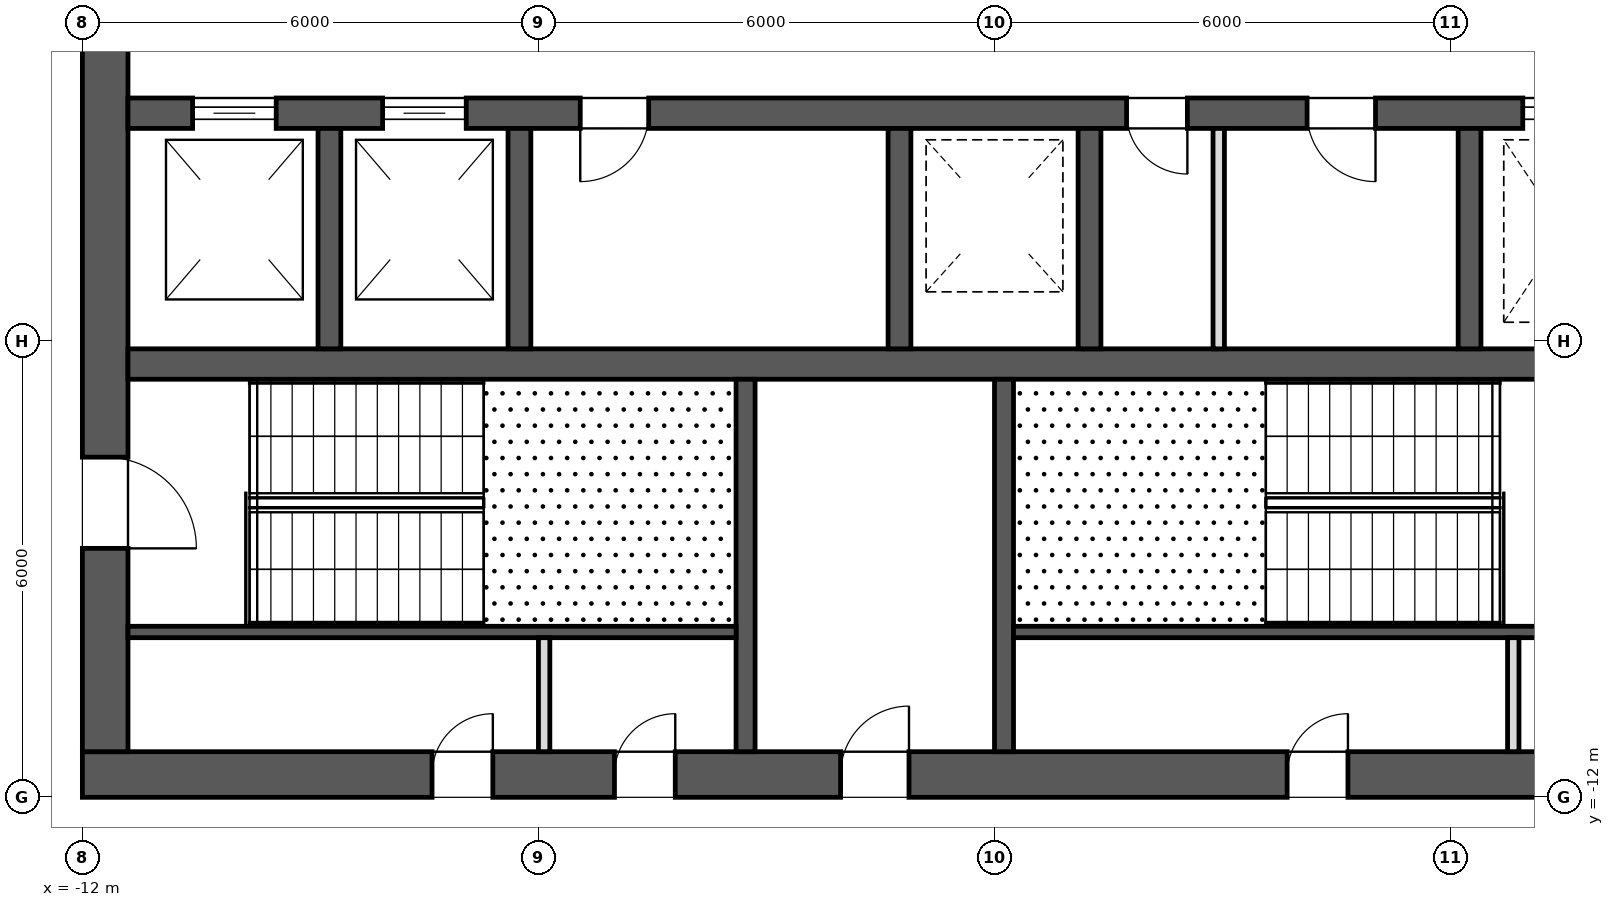
"""IFC4 building model, lengths in metres.
Left out: names, types, materials, properties, quantities, classifications, styles, units other than length and angle.
Written with IfcOpenShell. Run it as: python <this file> out.ifc"""

import sys

from ifc_helpers import new_model, si_unit, direction, frame, frame_2d, origin, place, context, subcontext, project, spatial, rectangle, extrude, element, fill, save


model = new_model("IFC4")
c1 = context("Model", 3, precision=1e-05, world=origin(), true_north=direction((0.0, 1.0)))
c2 = subcontext(c1, "Body", "Model", "MODEL_VIEW")
j1 = project(units=[si_unit("LENGTHUNIT", "METRE"), si_unit("PLANEANGLEUNIT", "RADIAN")], contexts=[c1])
p1 = place(None, origin())
s1 = spatial("IfcSite", under=j1, at=p1, CompositionType="ELEMENT")
p2 = place(p1, origin())
s2 = spatial("IfcBuilding", under=s1, at=p2, CompositionType="ELEMENT")
p3 = place(p2, frame((0.0, 0.0, 324.3)))
s3 = spatial("IfcBuildingStorey", under=s2, at=p3, CompositionType="ELEMENT", Elevation=324.3)
p4 = place(p3, frame((-12.0, -11.7, 0.0), z_axis=(0.0, 0.0, 1.0), x_axis=(1.0, 0.0, 0.0)))
e1 = element("IfcWall", 1, at=p4, inside=s3, PredefinedType="SHEAR", context=c2, shape_type="SweptSolid", body=[
    extrude(rectangle(XDim=24.0, YDim=0.6, at=frame_2d((12.0, 0.0))), origin(), (0.0, 0.0, 1.0), 4.0),
])
p5 = place(p4, frame((9.975, 0.0, 0.0)))
e2 = element("IfcOpeningElement", 2, at=p5, cuts=e1, PredefinedType="OPENING", context=c2, shape_type="SweptSolid", body=[
    extrude(rectangle(XDim=0.9, YDim=2.1, at=frame_2d((0.45, 1.05))), frame((0.0, 0.312, 0.0), z_axis=(0.0, -1.0, 0.0), x_axis=(1.0, 0.0, 0.0)), (0.0, 0.0, 1.0), 0.624),
])
p6 = place(p4, frame((4.6, 0.0, 0.0)))
e3 = element("IfcOpeningElement", 3, at=p6, cuts=e1, PredefinedType="OPENING", context=c2, shape_type="SweptSolid", body=[
    extrude(rectangle(XDim=0.8, YDim=2.1, at=frame_2d((0.4, 1.05))), frame((0.0, 0.312, 0.0), z_axis=(0.0, -1.0, 0.0), x_axis=(1.0, 0.0, 0.0)), (0.0, 0.0, 1.0), 0.624),
])
p7 = place(p4, frame((7.0, 0.0, 0.0)))
e4 = element("IfcOpeningElement", 4, at=p7, cuts=e1, PredefinedType="OPENING", context=c2, shape_type="SweptSolid", body=[
    extrude(rectangle(XDim=0.8, YDim=2.1, at=frame_2d((0.4, 1.05))), frame((0.0, 0.312, 0.0), z_axis=(0.0, -1.0, 0.0), x_axis=(1.0, 0.0, 0.0)), (0.0, 0.0, 1.0), 0.624),
])
p8 = place(p4, frame((15.85, 0.0, 0.0)))
e5 = element("IfcOpeningElement", 5, at=p8, cuts=e1, PredefinedType="OPENING", context=c2, shape_type="SweptSolid", body=[
    extrude(rectangle(XDim=0.8, YDim=2.1, at=frame_2d((0.4, 1.05))), frame((0.0, 0.312, 0.0), z_axis=(0.0, -1.0, 0.0), x_axis=(1.0, 0.0, 0.0)), (0.0, 0.0, 1.0), 0.624),
])
p9 = place(p3, frame((-11.7, -11.4, 0.0), z_axis=(0.0, 0.0, 1.0), x_axis=(0.0, 1.0, 0.0)))
e6 = element("IfcWall", 6, at=p9, inside=s3, PredefinedType="SHEAR", context=c2, shape_type="SweptSolid", body=[
    extrude(rectangle(XDim=22.8, YDim=0.6, at=frame_2d((11.4, 0.0))), origin(), (0.0, 0.0, 1.0), 4.0),
])
p10 = place(p9, frame((10.2, 0.0, 0.0)))
e7 = element("IfcOpeningElement", 7, at=p10, cuts=e6, PredefinedType="OPENING", context=c2, shape_type="SweptSolid", body=[
    extrude(rectangle(XDim=2.4, YDim=2.1, at=frame_2d((1.2, 1.05))), frame((0.0, 0.312, 0.0), z_axis=(0.0, -1.0, 0.0), x_axis=(1.0, 0.0, 0.0)), (0.0, 0.0, 1.0), 0.624),
])
p11 = place(p9, frame((18.925, 0.0, 0.0)))
e8 = element("IfcOpeningElement", 8, at=p11, cuts=e6, PredefinedType="OPENING", context=c2, shape_type="SweptSolid", body=[
    extrude(rectangle(XDim=1.2, YDim=2.1, at=frame_2d((0.6, 1.05))), frame((0.0, 0.312, 0.0), z_axis=(0.0, -1.0, 0.0), x_axis=(1.0, 0.0, 0.0)), (0.0, 0.0, 1.0), 0.624),
])
p12 = place(p9, frame((2.675, 0.0, 0.0)))
e9 = element("IfcOpeningElement", 9, at=p12, cuts=e6, PredefinedType="OPENING", context=c2, shape_type="SweptSolid", body=[
    extrude(rectangle(XDim=1.2, YDim=2.1, at=frame_2d((0.6, 1.05))), frame((0.0, 0.312, 0.0), z_axis=(0.0, -1.0, 0.0), x_axis=(1.0, 0.0, 0.0)), (0.0, 0.0, 1.0), 0.624),
])
p13 = place(p3, frame((-11.4, -3.0, 0.0), z_axis=(0.0, 0.0, 1.0), x_axis=(1.0, 0.0, 0.0)))
e10 = element("IfcWall", 10, at=p13, inside=s3, PredefinedType="SHEAR", context=c2, shape_type="SweptSolid", body=[
    extrude(rectangle(XDim=22.8, YDim=0.4, at=frame_2d((11.4, 0.0))), origin(), (0.0, 0.0, 1.0), 4.0),
])
p14 = place(p13, frame((0.85, 0.0, 0.0)))
e11 = element("IfcOpeningElement", 11, at=p14, cuts=e10, PredefinedType="OPENING", context=c2, shape_type="SweptSolid", body=[
    extrude(rectangle(XDim=1.1, YDim=2.1, at=frame_2d((0.55, 1.05))), frame((0.0, 0.212, 0.0), z_axis=(0.0, -1.0, 0.0), x_axis=(1.0, 0.0, 0.0)), (0.0, 0.0, 1.0), 0.424),
])
p15 = place(p13, frame((3.35, 0.0, 0.0)))
e12 = element("IfcOpeningElement", 12, at=p15, cuts=e10, PredefinedType="OPENING", context=c2, shape_type="SweptSolid", body=[
    extrude(rectangle(XDim=1.1, YDim=2.1, at=frame_2d((0.55, 1.05))), frame((0.0, 0.212, 0.0), z_axis=(0.0, -1.0, 0.0), x_axis=(1.0, 0.0, 0.0)), (0.0, 0.0, 1.0), 0.424),
])
p16 = place(p13, frame((18.35, 0.0, 0.0)))
e13 = element("IfcOpeningElement", 13, at=p16, cuts=e10, PredefinedType="OPENING", context=c2, shape_type="SweptSolid", body=[
    extrude(rectangle(XDim=1.1, YDim=2.1, at=frame_2d((0.55, 1.05))), frame((0.0, 0.212, 0.0), z_axis=(0.0, -1.0, 0.0), x_axis=(1.0, 0.0, 0.0)), (0.0, 0.0, 1.0), 0.424),
])
p17 = place(p13, frame((13.137, 0.0, 0.0)))
e14 = element("IfcOpeningElement", 14, at=p17, cuts=e10, PredefinedType="OPENING", context=c2, shape_type="SweptSolid", body=[
    extrude(rectangle(XDim=0.8, YDim=2.1, at=frame_2d((0.4, 1.05))), frame((0.0, 0.212, 0.0), z_axis=(0.0, -1.0, 0.0), x_axis=(1.0, 0.0, 0.0)), (0.0, 0.0, 1.0), 0.424),
])
p18 = place(p13, frame((15.512, 0.0, 0.0)))
e15 = element("IfcOpeningElement", 15, at=p18, cuts=e10, PredefinedType="OPENING", context=c2, shape_type="SweptSolid", body=[
    extrude(rectangle(XDim=0.9, YDim=2.1, at=frame_2d((0.45, 1.05))), frame((0.0, 0.212, 0.0), z_axis=(0.0, -1.0, 0.0), x_axis=(1.0, 0.0, 0.0)), (0.0, 0.0, 1.0), 0.424),
])
p19 = place(p13, frame((5.95, 0.0, 0.0)))
e16 = element("IfcOpeningElement", 16, at=p19, cuts=e10, PredefinedType="OPENING", context=c2, shape_type="SweptSolid", body=[
    extrude(rectangle(XDim=0.9, YDim=2.1, at=frame_2d((0.45, 1.05))), frame((0.0, 0.212, 0.0), z_axis=(0.0, -1.0, 0.0), x_axis=(1.0, 0.0, 0.0)), (0.0, 0.0, 1.0), 0.424),
])
p20 = place(p3, frame((-11.4, -6.3, 0.0), z_axis=(0.0, 0.0, 1.0), x_axis=(1.0, 0.0, 0.0)))
e17 = element("IfcWall", 17, at=p20, inside=s3, PredefinedType="SHEAR", context=c2, shape_type="SweptSolid", body=[
    extrude(rectangle(XDim=22.8, YDim=0.4, at=frame_2d((11.4, 0.0))), origin(), (0.0, 0.0, 1.0), 4.0),
])
p21 = place(p20, frame((20.85, 0.0, 0.0)))
e18 = element("IfcOpeningElement", 18, at=p21, cuts=e17, PredefinedType="OPENING", context=c2, shape_type="SweptSolid", body=[
    extrude(rectangle(XDim=1.1, YDim=2.1, at=frame_2d((0.55, 1.05))), frame((0.0, 0.212, 0.0), z_axis=(0.0, -1.0, 0.0), x_axis=(1.0, 0.0, 0.0)), (0.0, 0.0, 1.0), 0.424),
])
for number, where, z_axis, x_axis in (
    (19, (-8.75, -6.1, 0.0), (0.0, 0.0, 1.0), (0.0, 1.0, 0.0)),
    (20, (-6.25, -6.1, 0.0), (0.0, 0.0, 1.0), (0.0, 1.0, 0.0)),
    (21, (-1.25, -6.1, 0.0), (0.0, 0.0, 1.0), (0.0, 1.0, 0.0)),
    (22, (1.25, -6.1, 0.0), (0.0, 0.0, 1.0), (0.0, 1.0, 0.0)),
    (23, (6.25, -6.1, 0.0), (0.0, 0.0, 1.0), (0.0, 1.0, 0.0)),
):
    element("IfcWall", number, at=place(p3, frame(where, z_axis=z_axis, x_axis=x_axis)), inside=s3, PredefinedType="SHEAR", context=c2, shape_type="SweptSolid", body=[
        extrude(rectangle(XDim=2.9, YDim=0.3, at=frame_2d((1.45, 0.0))), origin(), (0.0, 0.0, 1.0), 4.0),
    ])
for number, where, z_axis, x_axis in (
    (24, (-3.275, -11.4, 0.0), (0.0, 0.0, 1.0), (0.0, 1.0, 0.0)),
    (25, (0.125, -11.4, 0.0), (0.0, 0.0, 1.0), (0.0, 1.0, 0.0)),
):
    element("IfcWall", number, at=place(p3, frame(where, z_axis=z_axis, x_axis=x_axis)), inside=s3, PredefinedType="SHEAR", context=c2, shape_type="SweptSolid", body=[
        extrude(rectangle(XDim=4.9, YDim=0.25, at=frame_2d((2.45, 0.0))), origin(), (0.0, 0.0, 1.0), 3.65),
    ])
for number, where, z_axis, x_axis in (
    (26, (-11.4, -9.825, 0.0), (0.0, 0.0, 1.0), (1.0, 0.0, 0.0)),
    (27, (0.25, -9.825, 0.0), (0.0, 0.0, 1.0), (1.0, 0.0, 0.0)),
):
    element("IfcWall", number, at=place(p3, frame(where, z_axis=z_axis, x_axis=x_axis)), inside=s3, PredefinedType="SHEAR", context=c2, shape_type="SweptSolid", body=[
        extrude(rectangle(XDim=8.0, YDim=0.15, at=frame_2d((4.0, 0.0))), origin(), (0.0, 0.0, 1.0), 3.65),
    ])
for number, where, z_axis, x_axis in (
    (28, (-5.925, -11.4, 0.0), (0.0, 0.0, 1.0), (0.0, 1.0, 0.0)),
    (29, (6.825, -11.4, 0.0), (0.0, 0.0, 1.0), (0.0, 1.0, 0.0)),
):
    element("IfcWall", number, at=place(p3, frame(where, z_axis=z_axis, x_axis=x_axis)), inside=s3, PredefinedType="PARTITIONING", context=c2, shape_type="SweptSolid", body=[
        extrude(rectangle(XDim=1.5, YDim=0.15, at=frame_2d((0.75, 0.0))), origin(), (0.0, 0.0, 1.0), 3.65),
    ])
p22 = place(p3, frame((2.95, -6.1, 0.0), z_axis=(0.0, 0.0, 1.0), x_axis=(0.0, 1.0, 0.0)))
e30 = element("IfcWall", 30, at=p22, inside=s3, PredefinedType="PARTITIONING", context=c2, shape_type="SweptSolid", body=[
    extrude(rectangle(XDim=2.9, YDim=0.15, at=frame_2d((1.45, 0.0))), origin(), (0.0, 0.0, 1.0), 3.65),
])
p23 = place(p14, origin())
e31 = element("IfcDoor", 31, at=p23, inside=s3, OperationType="SLIDING_TO_LEFT", PredefinedType="DOOR", context=c2, shape_type="SweptSolid", body=[
    extrude(rectangle(XDim=1.1, YDim=2.1, at=frame_2d((0.55, 1.05))), frame((0.0, 0.025, 0.0), z_axis=(0.0, -1.0, 0.0), x_axis=(1.0, 0.0, 0.0)), (0.0, 0.0, 1.0), 0.05),
])
fill(e11, e31)
p24 = place(p15, origin())
e32 = element("IfcDoor", 32, at=p24, inside=s3, OperationType="SLIDING_TO_LEFT", PredefinedType="DOOR", context=c2, shape_type="SweptSolid", body=[
    extrude(rectangle(XDim=1.1, YDim=2.1, at=frame_2d((0.55, 1.05))), frame((0.0, 0.025, 0.0), z_axis=(0.0, -1.0, 0.0), x_axis=(1.0, 0.0, 0.0)), (0.0, 0.0, 1.0), 0.05),
])
fill(e12, e32)
p25 = place(p16, origin())
e33 = element("IfcDoor", 33, at=p25, inside=s3, OperationType="SLIDING_TO_LEFT", PredefinedType="DOOR", context=c2, shape_type="SweptSolid", body=[
    extrude(rectangle(XDim=1.1, YDim=2.1, at=frame_2d((0.55, 1.05))), frame((0.0, 0.025, 0.0), z_axis=(0.0, -1.0, 0.0), x_axis=(1.0, 0.0, 0.0)), (0.0, 0.0, 1.0), 0.05),
])
fill(e13, e33)
p26 = place(p12, frame((1.2, 0.0, 0.0), z_axis=(0.0, 0.0, 1.0), x_axis=(-1.0, 0.0, 0.0)))
e34 = element("IfcDoor", 34, at=p26, inside=s3, OperationType="SINGLE_SWING_LEFT", PredefinedType="DOOR", context=c2, shape_type="SweptSolid", body=[
    extrude(rectangle(XDim=1.2, YDim=2.1, at=frame_2d((0.6, 1.05))), frame((0.0, 0.025, 0.0), z_axis=(0.0, -1.0, 0.0), x_axis=(1.0, 0.0, 0.0)), (0.0, 0.0, 1.0), 0.05),
])
fill(e9, e34)
p27 = place(p5, origin())
e35 = element("IfcDoor", 35, at=p27, inside=s3, OperationType="SINGLE_SWING_LEFT", PredefinedType="DOOR", context=c2, shape_type="SweptSolid", body=[
    extrude(rectangle(XDim=0.9, YDim=2.1, at=frame_2d((0.45, 1.05))), frame((0.0, 0.025, 0.0), z_axis=(0.0, -1.0, 0.0), x_axis=(1.0, 0.0, 0.0)), (0.0, 0.0, 1.0), 0.05),
])
fill(e2, e35)
p28 = place(p6, origin())
e36 = element("IfcDoor", 36, at=p28, inside=s3, OperationType="SINGLE_SWING_LEFT", PredefinedType="DOOR", context=c2, shape_type="SweptSolid", body=[
    extrude(rectangle(XDim=0.8, YDim=2.1, at=frame_2d((0.4, 1.05))), frame((0.0, 0.025, 0.0), z_axis=(0.0, -1.0, 0.0), x_axis=(1.0, 0.0, 0.0)), (0.0, 0.0, 1.0), 0.05),
])
fill(e3, e36)
p29 = place(p7, origin())
e37 = element("IfcDoor", 37, at=p29, inside=s3, OperationType="SINGLE_SWING_LEFT", PredefinedType="DOOR", context=c2, shape_type="SweptSolid", body=[
    extrude(rectangle(XDim=0.8, YDim=2.1, at=frame_2d((0.4, 1.05))), frame((0.0, 0.025, 0.0), z_axis=(0.0, -1.0, 0.0), x_axis=(1.0, 0.0, 0.0)), (0.0, 0.0, 1.0), 0.05),
])
fill(e4, e37)
p30 = place(p8, origin())
e38 = element("IfcDoor", 38, at=p30, inside=s3, OperationType="SINGLE_SWING_LEFT", PredefinedType="DOOR", context=c2, shape_type="SweptSolid", body=[
    extrude(rectangle(XDim=0.8, YDim=2.1, at=frame_2d((0.4, 1.05))), frame((0.0, 0.025, 0.0), z_axis=(0.0, -1.0, 0.0), x_axis=(1.0, 0.0, 0.0)), (0.0, 0.0, 1.0), 0.05),
])
fill(e5, e38)
p31 = place(p17, frame((0.8, 0.0, 0.0), z_axis=(0.0, 0.0, 1.0), x_axis=(-1.0, 0.0, 0.0)))
e39 = element("IfcDoor", 39, at=p31, inside=s3, OperationType="SINGLE_SWING_RIGHT", PredefinedType="DOOR", context=c2, shape_type="SweptSolid", body=[
    extrude(rectangle(XDim=0.8, YDim=2.1, at=frame_2d((0.4, 1.05))), frame((0.0, 0.025, 0.0), z_axis=(0.0, -1.0, 0.0), x_axis=(1.0, 0.0, 0.0)), (0.0, 0.0, 1.0), 0.05),
])
fill(e14, e39)
p32 = place(p18, frame((0.9, 0.0, 0.0), z_axis=(0.0, 0.0, 1.0), x_axis=(-1.0, 0.0, 0.0)))
e40 = element("IfcDoor", 40, at=p32, inside=s3, OperationType="SINGLE_SWING_RIGHT", PredefinedType="DOOR", context=c2, shape_type="SweptSolid", body=[
    extrude(rectangle(XDim=0.9, YDim=2.1, at=frame_2d((0.45, 1.05))), frame((0.0, 0.025, 0.0), z_axis=(0.0, -1.0, 0.0), x_axis=(1.0, 0.0, 0.0)), (0.0, 0.0, 1.0), 0.05),
])
fill(e15, e40)
p33 = place(p19, frame((0.9, 0.0, 0.0), z_axis=(0.0, 0.0, 1.0), x_axis=(-1.0, 0.0, 0.0)))
e41 = element("IfcDoor", 41, at=p33, inside=s3, OperationType="SINGLE_SWING_LEFT", PredefinedType="DOOR", context=c2, shape_type="SweptSolid", body=[
    extrude(rectangle(XDim=0.9, YDim=2.1, at=frame_2d((0.45, 1.05))), frame((0.0, 0.025, 0.0), z_axis=(0.0, -1.0, 0.0), x_axis=(1.0, 0.0, 0.0)), (0.0, 0.0, 1.0), 0.05),
])
fill(e16, e41)
save(model, sys.argv[1])
